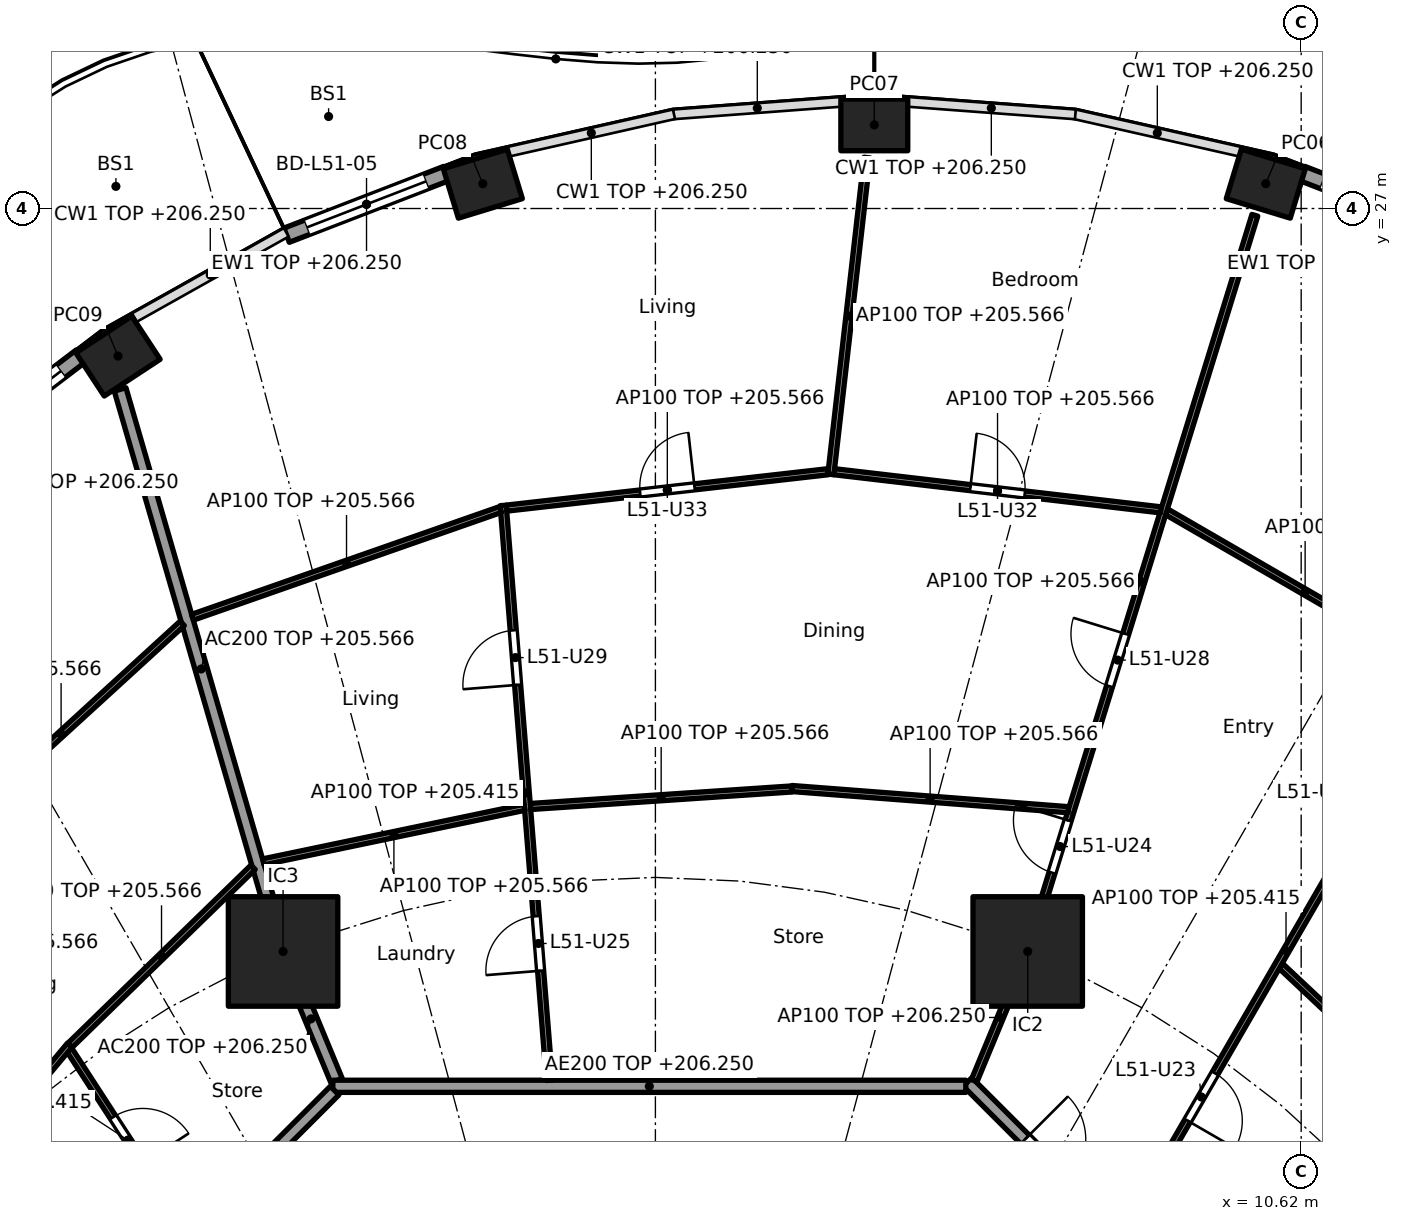
"""IFC4 building model, lengths in metres.
Left out: names, types, materials, properties, quantities, classifications, styles, units other than length and angle.
Written with IfcOpenShell. Run it as: python <this file> out.ifc"""

import sys

from ifc_helpers import new_model, si_unit, direction, frame, frame_2d, origin, origin_2d, place, context, subcontext, project, spatial, rectangle, hollow_rectangle, extrude, element, fill, save


model = new_model("IFC4")
c1 = context("Model", 3, precision=1e-05, world=origin(), true_north=direction((0.0, 1.0)))
c2 = subcontext(c1, "Body", "Model", "MODEL_VIEW")
j1 = project(units=[si_unit("LENGTHUNIT", "METRE"), si_unit("PLANEANGLEUNIT", "RADIAN")], contexts=[c1])
p1 = place(None, origin())
s1 = spatial("IfcSite", under=j1, at=p1, CompositionType="ELEMENT")
p2 = place(p1, origin())
s2 = spatial("IfcBuilding", under=s1, at=p2, CompositionType="ELEMENT")
p3 = place(p2, frame((0.0, 0.0, 202.9)))
s3 = spatial("IfcBuildingStorey", under=s2, at=p3, CompositionType="ELEMENT", Elevation=202.9)
for number, where, z_axis, x_axis in (
    (1, (10.038, 27.408, 0.0), (0.0, 0.0, 1.0), (-0.957, 0.292, 0.0)),
    (2, (3.6, 28.375, 0.0), (0.0, 0.0, 1.0), (-1.0, 0.0, 0.0)),
    (3, (-2.838, 27.408, 0.0), (0.0, 0.0, 1.0), (-0.957, -0.292, 0.0)),
    (4, (-8.837, 24.573, 0.0), (0.0, 0.0, 1.0), (-0.836, -0.549, 0.0)),
):
    element("IfcColumn", number, at=place(p3, frame(where, z_axis=z_axis, x_axis=x_axis)), inside=s3, PredefinedType="COLUMN", context=c2, shape_type="SweptSolid", body=[
        extrude(hollow_rectangle(XDim=1.1, YDim=0.85, WallThickness=0.036, at=origin_2d()), origin(), (0.0, 0.0, 1.0), 3.7),
    ])
for number, where, z_axis, x_axis in (
    (5, (6.123, 14.782, 0.0), (0.0, 0.0, 1.0), (1.0, 0.0, 0.0)),
    (6, (-6.123, 14.782, 0.0), (0.0, 0.0, 1.0), (1.0, 0.0, 0.0)),
):
    element("IfcColumn", number, at=place(p3, frame(where, z_axis=z_axis, x_axis=x_axis)), inside=s3, PredefinedType="COLUMN", context=c2, shape_type="SweptSolid", body=[
        extrude(rectangle(XDim=1.8, YDim=1.8, at=origin_2d()), origin(), (0.0, 0.0, 1.0), 3.7),
    ])
p4 = place(p3, frame((10.635, 27.576, 0.0), z_axis=(0.0, 0.0, 1.0), x_axis=(0.932806734513, -0.360377019311, 0.0)))
e7 = element("IfcWall", 7, at=p4, inside=s3, PredefinedType="SOLIDWALL", context=c2, shape_type="SweptSolid", body=[
    extrude(rectangle(XDim=2.82, YDim=0.25, at=frame_2d((1.41, 0.0))), origin(), (0.0, 0.0, 1.0), 3.35),
])
p5 = place(p4, frame((0.36, 0.0, 0.0)))
e8 = element("IfcOpeningElement", 8, at=p5, cuts=e7, PredefinedType="OPENING", context=c2, shape_type="SweptSolid", body=[
    extrude(rectangle(XDim=2.1, YDim=2.4, at=frame_2d((1.05, 1.2))), frame((0.0, 0.135, 0.0), z_axis=(0.0, -1.0, 0.0), x_axis=(1.0, 0.0, 0.0)), (0.0, 0.0, 1.0), 0.27),
])
p6 = place(p3, frame((-6.065, 26.56, 0.0), z_axis=(0.0, 0.0, 1.0), x_axis=(0.932795487898, 0.360406128911, 0.0)))
e9 = element("IfcWall", 9, at=p6, inside=s3, PredefinedType="SOLIDWALL", context=c2, shape_type="SweptSolid", body=[
    extrude(rectangle(XDim=2.819, YDim=0.25, at=frame_2d((1.41, 0.0))), origin(), (0.0, 0.0, 1.0), 3.35),
])
p7 = place(p6, frame((0.36, 0.0, 0.0)))
e10 = element("IfcOpeningElement", 10, at=p7, cuts=e9, PredefinedType="OPENING", context=c2, shape_type="SweptSolid", body=[
    extrude(rectangle(XDim=2.1, YDim=2.4, at=frame_2d((1.05, 1.2))), frame((0.0, 0.135, 0.0), z_axis=(0.0, -1.0, 0.0), x_axis=(1.0, 0.0, 0.0)), (0.0, 0.0, 1.0), 0.27),
])
p8 = place(p3, frame((-11.772, 22.809, 0.0), z_axis=(0.0, 0.0, 1.0), x_axis=(0.796055733703, 0.60522332146, 0.0)))
e11 = element("IfcWall", 11, at=p8, inside=s3, PredefinedType="SOLIDWALL", context=c2, shape_type="SweptSolid", body=[
    extrude(rectangle(XDim=2.917, YDim=0.25, at=frame_2d((1.458, 0.0))), origin(), (0.0, 0.0, 1.0), 3.35),
])
p9 = place(p8, frame((0.408, 0.0, 0.0)))
e12 = element("IfcOpeningElement", 12, at=p9, cuts=e11, PredefinedType="OPENING", context=c2, shape_type="SweptSolid", body=[
    extrude(rectangle(XDim=2.1, YDim=2.4, at=frame_2d((1.05, 1.2))), frame((0.0, 0.135, 0.0), z_axis=(0.0, -1.0, 0.0), x_axis=(1.0, 0.0, 0.0)), (0.0, 0.0, 1.0), 0.27),
])
p10 = place(p3, frame((-5.243, 12.657, 0.0), z_axis=(0.0, 0.0, 1.0), x_axis=(-0.382707856524, 0.923869415315, 0.0)))
e13 = element("IfcWall", 13, at=p10, inside=s3, PredefinedType="PARTITIONING", context=c2, shape_type="SweptSolid", body=[
    extrude(rectangle(XDim=2.2, YDim=0.2, at=frame_2d((1.1, 0.0))), origin(), (0.0, 0.0, 1.0), 3.35),
])
p11 = place(p3, frame((-6.137, 14.83, 0.0), z_axis=(0.0, 0.0, 1.0), x_axis=(-0.278461169897, 0.96044748782, 0.0)))
e14 = element("IfcWall", 14, at=p11, inside=s3, PredefinedType="PARTITIONING", context=c2, shape_type="SweptSolid", body=[
    extrude(rectangle(XDim=9.573, YDim=0.2, at=frame_2d((4.787, 0.0))), origin(), (0.0, 0.0, 1.0), 2.666),
])
p12 = place(p3, frame((12.635, 5.134, 0.0), z_axis=(0.0, 0.0, 1.0), x_axis=(-0.707106781187, 0.707106781187, 0.0)))
e15 = element("IfcWall", 15, at=p12, inside=s3, PredefinedType="PARTITIONING", context=c2, shape_type="SweptSolid", body=[
    extrude(rectangle(XDim=10.609, YDim=0.2, at=frame_2d((5.305, 0.0))), origin(), (0.0, 0.0, 1.0), 3.35),
])
p13 = place(p12, frame((8.274, 0.0, 0.0)))
e16 = element("IfcOpeningElement", 16, at=p13, cuts=e15, PredefinedType="OPENING", context=c2, shape_type="SweptSolid", body=[
    extrude(rectangle(XDim=1.0, YDim=2.1, at=frame_2d((0.5, 1.05))), frame((0.0, 0.11, 0.0), z_axis=(0.0, -1.0, 0.0), x_axis=(1.0, 0.0, 0.0)), (0.0, 0.0, 1.0), 0.22),
])
p14 = place(p3, frame((5.104, 12.565, 0.0), z_axis=(0.0, 0.0, 1.0), x_axis=(-1.0, 0.0, 0.0)))
e17 = element("IfcWall", 17, at=p14, inside=s3, PredefinedType="PARTITIONING", context=c2, shape_type="SweptSolid", body=[
    extrude(rectangle(XDim=10.409, YDim=0.2, at=frame_2d((5.205, 0.0))), origin(), (0.0, 0.0, 1.0), 3.35),
])
p15 = place(p3, frame((-5.275, 12.494, 0.0), z_axis=(0.0, 0.0, 1.0), x_axis=(-0.707106781187, -0.707106781187, 0.0)))
e18 = element("IfcWall", 18, at=p15, inside=s3, PredefinedType="PARTITIONING", context=c2, shape_type="SweptSolid", body=[
    extrude(rectangle(XDim=10.209, YDim=0.2, at=frame_2d((5.104, 0.0))), origin(), (0.0, 0.0, 1.0), 3.35),
])
p16 = place(p3, frame((13.504, 11.52, 0.0), z_axis=(0.0, 0.0, 1.0), x_axis=(-0.728885663674, 0.684635442619, 0.0)))
e19 = element("IfcWall", 19, at=p16, inside=s3, PredefinedType="PARTITIONING", context=c2, shape_type="SweptSolid", body=[
    extrude(rectangle(XDim=4.419, YDim=0.1, at=frame_2d((2.21, 0.0))), origin(), (0.0, 0.0, 1.0), 2.666),
])
p17 = place(p3, frame((7.708, 10.198, 0.0), z_axis=(0.0, 0.0, 1.0), x_axis=(0.501288100085, 0.865280440501, 0.0)))
e20 = element("IfcWall", 20, at=p17, inside=s3, PredefinedType="PARTITIONING", context=c2, shape_type="SweptSolid", body=[
    extrude(rectangle(XDim=10.623, YDim=0.1, at=frame_2d((5.312, 0.0))), origin(), (0.0, 0.0, 1.0), 2.515),
])
p18 = place(p17, frame((2.082, 0.0, 0.0)))
e21 = element("IfcOpeningElement", 21, at=p18, cuts=e20, PredefinedType="OPENING", context=c2, shape_type="SweptSolid", body=[
    extrude(rectangle(XDim=0.9, YDim=2.1, at=frame_2d((0.45, 1.05))), frame((0.0, 0.06, 0.0), z_axis=(0.0, -1.0, 0.0), x_axis=(1.0, 0.0, 0.0)), (0.0, 0.0, 1.0), 0.12),
])
p19 = place(p17, frame((7.369, 0.0, 0.0)))
e22 = element("IfcOpeningElement", 22, at=p19, cuts=e20, PredefinedType="OPENING", context=c2, shape_type="SweptSolid", body=[
    extrude(rectangle(XDim=0.9, YDim=2.1, at=frame_2d((0.45, 1.05))), frame((0.0, 0.06, 0.0), z_axis=(0.0, -1.0, 0.0), x_axis=(1.0, 0.0, 0.0)), (0.0, 0.0, 1.0), 0.12),
])
p20 = place(p3, frame((12.965, 19.371, 0.0), z_axis=(0.0, 0.0, 1.0), x_axis=(-0.865277177388, 0.501293732547, 0.0)))
e23 = element("IfcWall", 23, at=p20, inside=s3, PredefinedType="PARTITIONING", context=c2, shape_type="SweptSolid", body=[
    extrude(rectangle(XDim=5.27, YDim=0.1, at=frame_2d((2.635, 0.0))), origin(), (0.0, 0.0, 1.0), 2.666),
])
p21 = place(p3, frame((5.243, 12.657, 0.0), z_axis=(0.0, 0.0, 1.0), x_axis=(0.382719158442, 0.923864733477, 0.0)))
e24 = element("IfcWall", 24, at=p21, inside=s3, PredefinedType="PARTITIONING", context=c2, shape_type="SweptSolid", body=[
    extrude(rectangle(XDim=2.25, YDim=0.1, at=frame_2d((1.125, 0.0))), origin(), (0.0, 0.0, 1.0), 3.35),
])
p22 = place(p3, frame((6.138, 14.83, 0.0), z_axis=(0.0, 0.0, 1.0), x_axis=(0.294818517221, 0.955553264818, 0.0)))
e25 = element("IfcWall", 25, at=p22, inside=s3, PredefinedType="PARTITIONING", context=c2, shape_type="SweptSolid", body=[
    extrude(rectangle(XDim=12.619, YDim=0.1, at=frame_2d((6.31, 0.0))), origin(), (0.0, 0.0, 1.0), 2.666),
])
p23 = place(p22, frame((1.306, 0.0, 0.0)))
e26 = element("IfcOpeningElement", 26, at=p23, cuts=e25, PredefinedType="OPENING", context=c2, shape_type="SweptSolid", body=[
    extrude(rectangle(XDim=0.9, YDim=2.1, at=frame_2d((0.45, 1.05))), frame((0.0, 0.06, 0.0), z_axis=(0.0, -1.0, 0.0), x_axis=(1.0, 0.0, 0.0)), (0.0, 0.0, 1.0), 0.12),
])
p24 = place(p22, frame((4.515, 0.0, 0.0)))
e27 = element("IfcOpeningElement", 27, at=p24, cuts=e25, PredefinedType="OPENING", context=c2, shape_type="SweptSolid", body=[
    extrude(rectangle(XDim=0.9, YDim=2.1, at=frame_2d((0.45, 1.05))), frame((0.0, 0.06, 0.0), z_axis=(0.0, -1.0, 0.0), x_axis=(1.0, 0.0, 0.0)), (0.0, 0.0, 1.0), 0.12),
])
p25 = place(p3, frame((6.791, 17.113, 0.0), z_axis=(0.0, 0.0, 1.0), x_axis=(-0.997077117727, 0.07640171009, 0.0)))
e28 = element("IfcWall", 28, at=p25, inside=s3, PredefinedType="PARTITIONING", context=c2, shape_type="SweptSolid", body=[
    extrude(rectangle(XDim=4.56, YDim=0.1, at=frame_2d((2.28, 0.0))), origin(), (0.0, 0.0, 1.0), 2.666),
])
p26 = place(p3, frame((8.312, 22.044, 0.0), z_axis=(0.0, 0.0, 1.0), x_axis=(-0.993245806382, 0.1160291692, 0.0)))
e29 = element("IfcWall", 29, at=p26, inside=s3, PredefinedType="PARTITIONING", context=c2, shape_type="SweptSolid", body=[
    extrude(rectangle(XDim=5.408, YDim=0.1, at=frame_2d((2.704, 0.0))), origin(), (0.0, 0.0, 1.0), 2.666),
])
p27 = place(p26, frame((2.254, 0.0, 0.0)))
e30 = element("IfcOpeningElement", 30, at=p27, cuts=e29, PredefinedType="OPENING", context=c2, shape_type="SweptSolid", body=[
    extrude(rectangle(XDim=0.9, YDim=2.1, at=frame_2d((0.45, 1.05))), frame((0.0, 0.06, 0.0), z_axis=(0.0, -1.0, 0.0), x_axis=(1.0, 0.0, 0.0)), (0.0, 0.0, 1.0), 0.12),
])
p28 = place(p3, frame((2.244, 17.455, 0.0), z_axis=(0.0, 0.0, 1.0), x_axis=(-0.997754717554, -0.066974051687, 0.0)))
e31 = element("IfcWall", 31, at=p28, inside=s3, PredefinedType="PARTITIONING", context=c2, shape_type="SweptSolid", body=[
    extrude(rectangle(XDim=4.309, YDim=0.1, at=frame_2d((2.154, 0.0))), origin(), (0.0, 0.0, 1.0), 2.666),
])
p29 = place(p3, frame((2.885, 22.627, 0.0), z_axis=(0.0, 0.0, 1.0), x_axis=(0.113634556485, 0.993522615531, 0.0)))
e32 = element("IfcWall", 32, at=p29, inside=s3, PredefinedType="PARTITIONING", context=c2, shape_type="SweptSolid", body=[
    extrude(rectangle(XDim=5.244, YDim=0.1, at=frame_2d((2.622, 0.0))), origin(), (0.0, 0.0, 1.0), 2.666),
])
p30 = place(p3, frame((2.842, 22.671, 0.0), z_axis=(0.0, 0.0, 1.0), x_axis=(-0.993660315081, -0.112424099879, 0.0)))
e33 = element("IfcWall", 33, at=p30, inside=s3, PredefinedType="PARTITIONING", context=c2, shape_type="SweptSolid", body=[
    extrude(rectangle(XDim=5.325, YDim=0.1, at=frame_2d((2.662, 0.0))), origin(), (0.0, 0.0, 1.0), 2.666),
])
p31 = place(p30, frame((2.212, 0.0, 0.0)))
e34 = element("IfcOpeningElement", 34, at=p31, cuts=e33, PredefinedType="OPENING", context=c2, shape_type="SweptSolid", body=[
    extrude(rectangle(XDim=0.9, YDim=2.1, at=frame_2d((0.45, 1.05))), frame((0.0, 0.06, 0.0), z_axis=(0.0, -1.0, 0.0), x_axis=(1.0, 0.0, 0.0)), (0.0, 0.0, 1.0), 0.12),
])
p32 = place(p3, frame((-1.743, 12.665, 0.0), z_axis=(0.0, 0.0, 1.0), x_axis=(-0.080170892619, 0.996781133437, 0.0)))
e35 = element("IfcWall", 35, at=p32, inside=s3, PredefinedType="PARTITIONING", context=c2, shape_type="SweptSolid", body=[
    extrude(rectangle(XDim=9.483, YDim=0.1, at=frame_2d((4.741, 0.0))), origin(), (0.0, 0.0, 1.0), 2.515),
])
p33 = place(p32, frame((1.806, 0.0, 0.0)))
e36 = element("IfcOpeningElement", 36, at=p33, cuts=e35, PredefinedType="OPENING", context=c2, shape_type="SweptSolid", body=[
    extrude(rectangle(XDim=0.9, YDim=2.1, at=frame_2d((0.45, 1.05))), frame((0.0, 0.06, 0.0), z_axis=(0.0, -1.0, 0.0), x_axis=(1.0, 0.0, 0.0)), (0.0, 0.0, 1.0), 0.12),
])
p34 = place(p32, frame((6.523, 0.0, 0.0)))
e37 = element("IfcOpeningElement", 37, at=p34, cuts=e35, PredefinedType="OPENING", context=c2, shape_type="SweptSolid", body=[
    extrude(rectangle(XDim=0.9, YDim=2.1, at=frame_2d((0.45, 1.05))), frame((0.0, 0.06, 0.0), z_axis=(0.0, -1.0, 0.0), x_axis=(1.0, 0.0, 0.0)), (0.0, 0.0, 1.0), 0.12),
])
p35 = place(p3, frame((-2.154, 17.152, 0.0), z_axis=(0.0, 0.0, 1.0), x_axis=(-0.978906251581, -0.204309937631, 0.0)))
e38 = element("IfcWall", 38, at=p35, inside=s3, PredefinedType="PARTITIONING", context=c2, shape_type="SweptSolid", body=[
    extrude(rectangle(XDim=4.385, YDim=0.1, at=frame_2d((2.193, 0.0))), origin(), (0.0, 0.0, 1.0), 2.666),
])
p36 = place(p3, frame((-2.546, 22.051, 0.0), z_axis=(0.0, 0.0, 1.0), x_axis=(-0.94391294884, -0.330194404878, 0.0)))
e39 = element("IfcWall", 39, at=p36, inside=s3, PredefinedType="PARTITIONING", context=c2, shape_type="SweptSolid", body=[
    extrude(rectangle(XDim=5.367, YDim=0.1, at=frame_2d((2.684, 0.0))), origin(), (0.0, 0.0, 1.0), 2.666),
])
p37 = place(p3, frame((-6.616, 16.166, 0.0), z_axis=(0.0, 0.0, 1.0), x_axis=(-0.716919058692, -0.697156412352, 0.0)))
e40 = element("IfcWall", 40, at=p37, inside=s3, PredefinedType="PARTITIONING", context=c2, shape_type="SweptSolid", body=[
    extrude(rectangle(XDim=4.2, YDim=0.1, at=frame_2d((2.1, 0.0))), origin(), (0.0, 0.0, 1.0), 2.666),
])
p38 = place(p3, frame((-7.781, 20.178, 0.0), z_axis=(0.0, 0.0, 1.0), x_axis=(-0.73807320557, -0.674720640872, 0.0)))
e41 = element("IfcWall", 41, at=p38, inside=s3, PredefinedType="PARTITIONING", context=c2, shape_type="SweptSolid", body=[
    extrude(rectangle(XDim=5.399, YDim=0.1, at=frame_2d((2.699, 0.0))), origin(), (0.0, 0.0, 1.0), 2.666),
])
p39 = place(p3, frame((-7.712, 10.195, 0.0), z_axis=(0.0, 0.0, 1.0), x_axis=(-0.544170086001, 0.838974920663, 0.0)))
e42 = element("IfcWall", 42, at=p39, inside=s3, PredefinedType="PARTITIONING", context=c2, shape_type="SweptSolid", body=[
    extrude(rectangle(XDim=3.535, YDim=0.1, at=frame_2d((1.768, 0.0))), origin(), (0.0, 0.0, 1.0), 2.515),
])
p40 = place(p39, frame((1.318, 0.0, 0.0)))
e43 = element("IfcOpeningElement", 43, at=p40, cuts=e42, PredefinedType="OPENING", context=c2, shape_type="SweptSolid", body=[
    extrude(rectangle(XDim=0.9, YDim=2.1, at=frame_2d((0.45, 1.05))), frame((0.0, 0.06, 0.0), z_axis=(0.0, -1.0, 0.0), x_axis=(1.0, 0.0, 0.0)), (0.0, 0.0, 1.0), 0.12),
])
p41 = place(p3, frame((-9.631, 13.242, 0.0), z_axis=(0.0, 0.0, 1.0), x_axis=(-0.640315711982, -0.768111833647, 0.0)))
e44 = element("IfcWall", 44, at=p41, inside=s3, PredefinedType="PARTITIONING", context=c2, shape_type="SweptSolid", body=[
    extrude(rectangle(XDim=4.572, YDim=0.1, at=frame_2d((2.286, 0.0))), origin(), (0.0, 0.0, 1.0), 2.666),
])
p42 = place(p5, origin())
e45 = element("IfcDoor", 45, at=p42, inside=s3, OperationType="SLIDING_TO_LEFT", PredefinedType="DOOR", context=c2, shape_type="SweptSolid", body=[
    extrude(rectangle(XDim=2.1, YDim=2.4, at=frame_2d((1.05, 1.2))), frame((0.0, 0.025, 0.0), z_axis=(0.0, -1.0, 0.0), x_axis=(1.0, 0.0, 0.0)), (0.0, 0.0, 1.0), 0.05),
])
fill(e8, e45)
p43 = place(p7, origin())
e46 = element("IfcDoor", 46, at=p43, inside=s3, OperationType="SLIDING_TO_LEFT", PredefinedType="DOOR", context=c2, shape_type="SweptSolid", body=[
    extrude(rectangle(XDim=2.1, YDim=2.4, at=frame_2d((1.05, 1.2))), frame((0.0, 0.025, 0.0), z_axis=(0.0, -1.0, 0.0), x_axis=(1.0, 0.0, 0.0)), (0.0, 0.0, 1.0), 0.05),
])
fill(e10, e46)
p44 = place(p9, origin())
e47 = element("IfcDoor", 47, at=p44, inside=s3, OperationType="SLIDING_TO_LEFT", PredefinedType="DOOR", context=c2, shape_type="SweptSolid", body=[
    extrude(rectangle(XDim=2.1, YDim=2.4, at=frame_2d((1.05, 1.2))), frame((0.0, 0.025, 0.0), z_axis=(0.0, -1.0, 0.0), x_axis=(1.0, 0.0, 0.0)), (0.0, 0.0, 1.0), 0.05),
])
fill(e12, e47)
p45 = place(p13, frame((1.0, 0.0, 0.0), x_axis=(-1.0, 0.0, 0.0)))
e48 = element("IfcDoor", 48, at=p45, inside=s3, OperationType="SINGLE_SWING_LEFT", PredefinedType="DOOR", context=c2, shape_type="SweptSolid", body=[
    extrude(rectangle(XDim=1.0, YDim=2.1, at=frame_2d((0.5, 1.05))), frame((0.0, 0.025, 0.0), z_axis=(0.0, -1.0, 0.0), x_axis=(1.0, 0.0, 0.0)), (0.0, 0.0, 1.0), 0.05),
])
fill(e16, e48)
p46 = place(p18, frame((0.9, 0.0, 0.0), x_axis=(-1.0, 0.0, 0.0)))
e49 = element("IfcDoor", 49, at=p46, inside=s3, OperationType="SINGLE_SWING_RIGHT", PredefinedType="DOOR", context=c2, shape_type="SweptSolid", body=[
    extrude(rectangle(XDim=0.9, YDim=2.1, at=frame_2d((0.45, 1.05))), frame((0.0, 0.025, 0.0), z_axis=(0.0, -1.0, 0.0), x_axis=(1.0, 0.0, 0.0)), (0.0, 0.0, 1.0), 0.05),
])
fill(e21, e49)
p47 = place(p23, origin())
e50 = element("IfcDoor", 50, at=p47, inside=s3, OperationType="SINGLE_SWING_RIGHT", PredefinedType="DOOR", context=c2, shape_type="SweptSolid", body=[
    extrude(rectangle(XDim=0.9, YDim=2.1, at=frame_2d((0.45, 1.05))), frame((0.0, 0.025, 0.0), z_axis=(0.0, -1.0, 0.0), x_axis=(1.0, 0.0, 0.0)), (0.0, 0.0, 1.0), 0.05),
])
fill(e26, e50)
p48 = place(p33, origin())
e51 = element("IfcDoor", 51, at=p48, inside=s3, OperationType="SINGLE_SWING_LEFT", PredefinedType="DOOR", context=c2, shape_type="SweptSolid", body=[
    extrude(rectangle(XDim=0.9, YDim=2.1, at=frame_2d((0.45, 1.05))), frame((0.0, 0.025, 0.0), z_axis=(0.0, -1.0, 0.0), x_axis=(1.0, 0.0, 0.0)), (0.0, 0.0, 1.0), 0.05),
])
fill(e36, e51)
p49 = place(p24, origin())
e52 = element("IfcDoor", 52, at=p49, inside=s3, OperationType="SINGLE_SWING_RIGHT", PredefinedType="DOOR", context=c2, shape_type="SweptSolid", body=[
    extrude(rectangle(XDim=0.9, YDim=2.1, at=frame_2d((0.45, 1.05))), frame((0.0, 0.025, 0.0), z_axis=(0.0, -1.0, 0.0), x_axis=(1.0, 0.0, 0.0)), (0.0, 0.0, 1.0), 0.05),
])
fill(e27, e52)
p50 = place(p34, origin())
e53 = element("IfcDoor", 53, at=p50, inside=s3, OperationType="SINGLE_SWING_LEFT", PredefinedType="DOOR", context=c2, shape_type="SweptSolid", body=[
    extrude(rectangle(XDim=0.9, YDim=2.1, at=frame_2d((0.45, 1.05))), frame((0.0, 0.025, 0.0), z_axis=(0.0, -1.0, 0.0), x_axis=(1.0, 0.0, 0.0)), (0.0, 0.0, 1.0), 0.05),
])
fill(e37, e53)
p51 = place(p27, frame((0.9, 0.0, 0.0), x_axis=(-1.0, 0.0, 0.0)))
e54 = element("IfcDoor", 54, at=p51, inside=s3, OperationType="SINGLE_SWING_LEFT", PredefinedType="DOOR", context=c2, shape_type="SweptSolid", body=[
    extrude(rectangle(XDim=0.9, YDim=2.1, at=frame_2d((0.45, 1.05))), frame((0.0, 0.025, 0.0), z_axis=(0.0, -1.0, 0.0), x_axis=(1.0, 0.0, 0.0)), (0.0, 0.0, 1.0), 0.05),
])
fill(e30, e54)
p52 = place(p31, frame((0.9, 0.0, 0.0), x_axis=(-1.0, 0.0, 0.0)))
e55 = element("IfcDoor", 55, at=p52, inside=s3, OperationType="SINGLE_SWING_RIGHT", PredefinedType="DOOR", context=c2, shape_type="SweptSolid", body=[
    extrude(rectangle(XDim=0.9, YDim=2.1, at=frame_2d((0.45, 1.05))), frame((0.0, 0.025, 0.0), z_axis=(0.0, -1.0, 0.0), x_axis=(1.0, 0.0, 0.0)), (0.0, 0.0, 1.0), 0.05),
])
fill(e34, e55)
p53 = place(p40, frame((0.9, 0.0, 0.0), x_axis=(-1.0, 0.0, 0.0)))
e56 = element("IfcDoor", 56, at=p53, inside=s3, OperationType="SINGLE_SWING_RIGHT", PredefinedType="DOOR", context=c2, shape_type="SweptSolid", body=[
    extrude(rectangle(XDim=0.9, YDim=2.1, at=frame_2d((0.45, 1.05))), frame((0.0, 0.025, 0.0), z_axis=(0.0, -1.0, 0.0), x_axis=(1.0, 0.0, 0.0)), (0.0, 0.0, 1.0), 0.05),
])
fill(e43, e56)
save(model, sys.argv[1])
